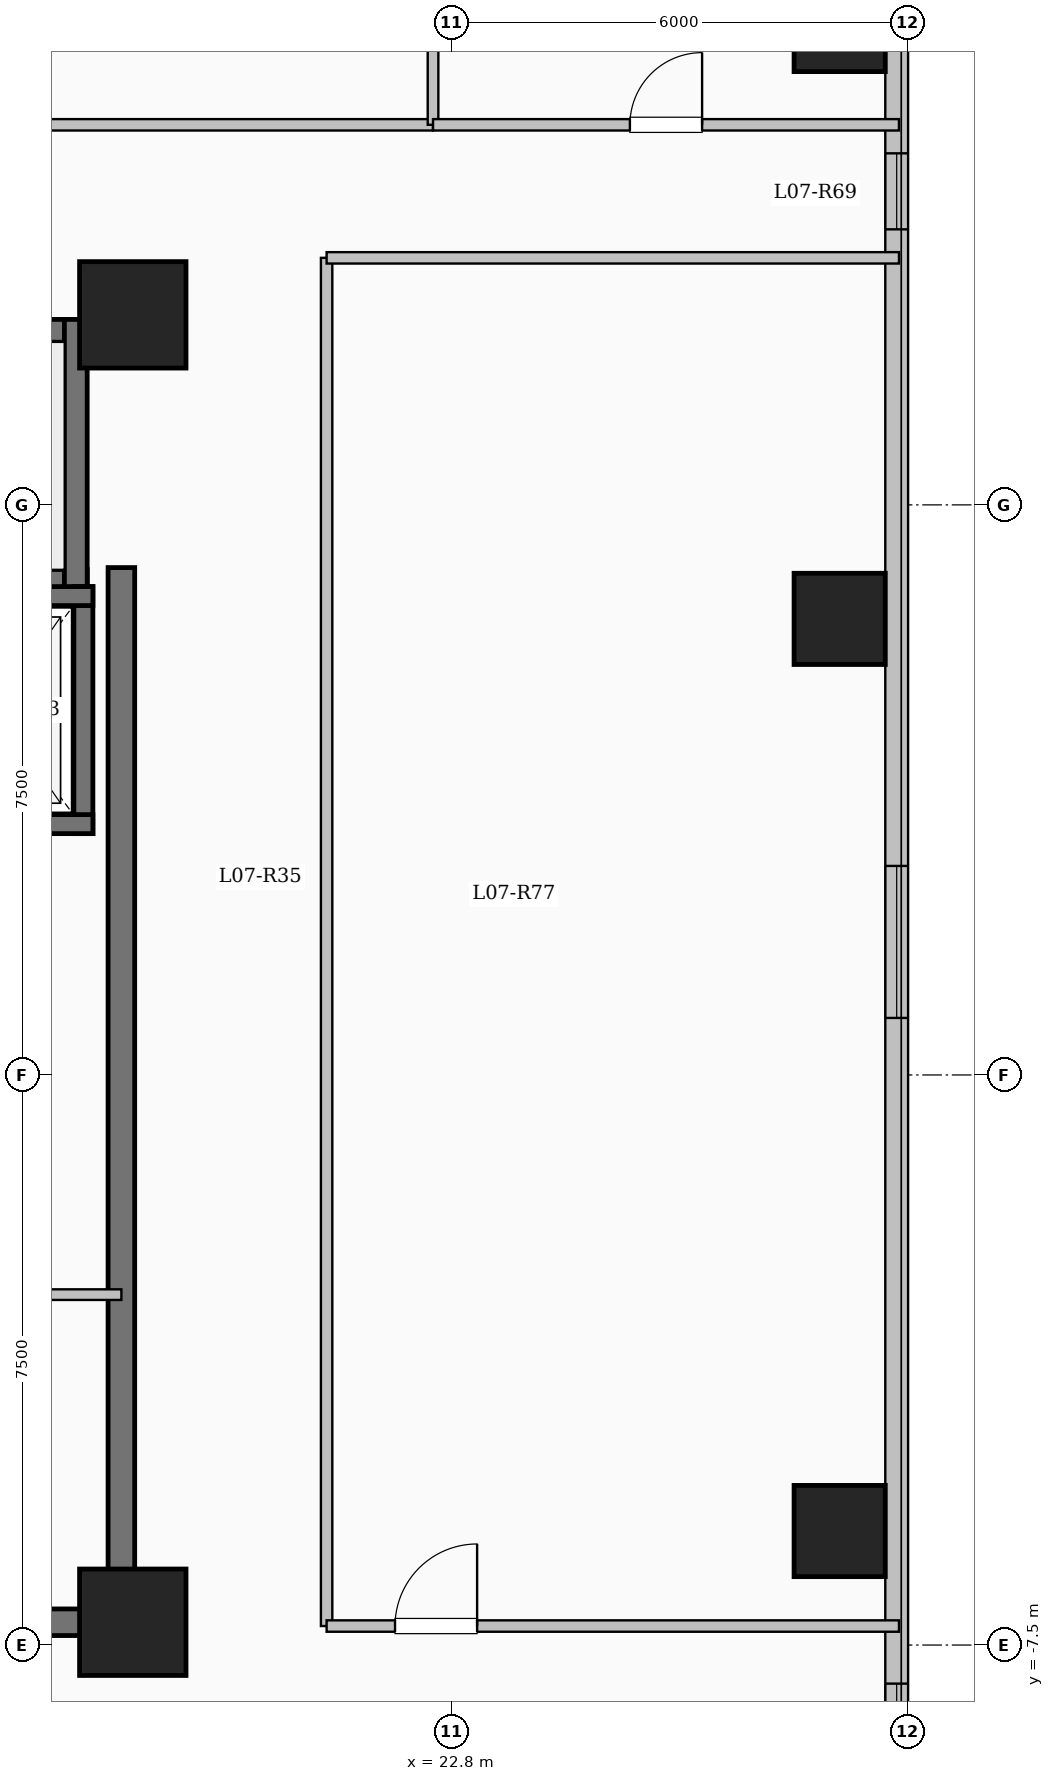
"""IFC4 building model, lengths in metres.
Left out: names, types, materials, properties, quantities, classifications, styles, units other than length and angle.
Written with IfcOpenShell. Run it as: python <this file> out.ifc"""

import sys

from ifc_helpers import new_model, si_unit, direction, frame, frame_2d, origin, origin_2d, place, context, subcontext, project, spatial, rectangle, extrude, element, fill, save


model = new_model("IFC4")
c1 = context("Model", 3, precision=1e-05, world=origin(), true_north=direction((0.0, 1.0)))
c2 = subcontext(c1, "Body", "Model", "MODEL_VIEW")
j1 = project(units=[si_unit("LENGTHUNIT", "METRE"), si_unit("PLANEANGLEUNIT", "RADIAN")], contexts=[c1])
p1 = place(None, origin())
s1 = spatial("IfcSite", under=j1, at=p1, CompositionType="ELEMENT")
p2 = place(p1, origin())
s2 = spatial("IfcBuilding", under=s1, at=p2, CompositionType="ELEMENT")
p3 = place(p2, frame((0.0, 0.0, 30.7)))
s3 = spatial("IfcBuildingStorey", under=s2, at=p3, CompositionType="ELEMENT", Elevation=30.7)
for number, where, z_axis, x_axis in (
    (1, (18.6, -7.2, 0.0), (0.0, 0.0, 1.0), (1.0, 0.0, 0.0)),
    (2, (18.6, 10.0, 0.0), (0.0, 0.0, 1.0), (1.0, 0.0, 0.0)),
):
    element("IfcColumn", number, at=place(p3, frame(where, z_axis=z_axis, x_axis=x_axis)), inside=s3, PredefinedType="COLUMN", context=c2, shape_type="SweptSolid", body=[
        extrude(rectangle(XDim=1.4, YDim=1.4, at=origin_2d()), origin(), (0.0, 0.0, 1.0), 3.35),
    ])
for number, where, z_axis, x_axis in (
    (3, (27.9, -6.0, 0.0), (0.0, 0.0, 1.0), (1.0, 0.0, 0.0)),
    (4, (27.9, 6.0, 0.0), (0.0, 0.0, 1.0), (1.0, 0.0, 0.0)),
    (5, (27.9, 13.8, 0.0), (0.0, 0.0, 1.0), (1.0, 0.0, 0.0)),
):
    element("IfcColumn", number, at=place(p3, frame(where, z_axis=z_axis, x_axis=x_axis)), inside=s3, PredefinedType="COLUMN", context=c2, shape_type="SweptSolid", body=[
        extrude(rectangle(XDim=1.2, YDim=1.2, at=origin_2d()), origin(), (0.0, 0.0, 1.0), 3.35),
    ])
p4 = place(p3, frame((28.65, 19.05, 0.0), z_axis=(0.0, 0.0, 1.0), x_axis=(0.0, -1.0, 0.0)))
e6 = element("IfcWall", 6, at=p4, inside=s3, PredefinedType="SOLIDWALL", context=c2, shape_type="SweptSolid", body=[
    extrude(rectangle(XDim=38.1, YDim=0.3, at=frame_2d((19.05, 0.0))), origin(), (0.0, 0.0, 1.0), 3.1),
])
p5 = place(p4, frame((2.275, 0.0, 0.9)))
e7 = element("IfcOpeningElement", 7, at=p5, cuts=e6, PredefinedType="OPENING", context=c2, shape_type="SweptSolid", body=[
    extrude(rectangle(XDim=2.0, YDim=1.7, at=frame_2d((1.0, 0.85))), frame((0.0, 0.16, 0.0), z_axis=(0.0, -1.0, 0.0), x_axis=(1.0, 0.0, 0.0)), (0.0, 0.0, 1.0), 0.32),
])
p6 = place(p4, frame((6.925, 0.0, 0.95)))
e8 = element("IfcOpeningElement", 8, at=p6, cuts=e6, PredefinedType="OPENING", context=c2, shape_type="SweptSolid", body=[
    extrude(rectangle(XDim=1.0, YDim=1.5, at=frame_2d((0.5, 0.75))), frame((0.0, 0.16, 0.0), z_axis=(0.0, -1.0, 0.0), x_axis=(1.0, 0.0, 0.0)), (0.0, 0.0, 1.0), 0.32),
])
p7 = place(p4, frame((16.3, 0.0, 0.9)))
e9 = element("IfcOpeningElement", 9, at=p7, cuts=e6, PredefinedType="OPENING", context=c2, shape_type="SweptSolid", body=[
    extrude(rectangle(XDim=2.0, YDim=1.7, at=frame_2d((1.0, 0.85))), frame((0.0, 0.16, 0.0), z_axis=(0.0, -1.0, 0.0), x_axis=(1.0, 0.0, 0.0)), (0.0, 0.0, 1.0), 0.32),
])
p8 = place(p4, frame((27.058, 0.0, 0.9)))
e10 = element("IfcOpeningElement", 10, at=p8, cuts=e6, PredefinedType="OPENING", context=c2, shape_type="SweptSolid", body=[
    extrude(rectangle(XDim=1.5, YDim=1.65, at=frame_2d((0.75, 0.825))), frame((0.0, 0.16, 0.0), z_axis=(0.0, -1.0, 0.0), x_axis=(1.0, 0.0, 0.0)), (0.0, 0.0, 1.0), 0.32),
])
p9 = place(p4, frame((32.55, 0.0, 0.9)))
e11 = element("IfcOpeningElement", 11, at=p9, cuts=e6, PredefinedType="OPENING", context=c2, shape_type="SweptSolid", body=[
    extrude(rectangle(XDim=2.4, YDim=1.8, at=frame_2d((1.2, 0.9))), frame((0.0, 0.16, 0.0), z_axis=(0.0, -1.0, 0.0), x_axis=(1.0, 0.0, 0.0)), (0.0, 0.0, 1.0), 0.32),
])
p10 = place(p3, frame((10.0, 9.79, 0.0), z_axis=(0.0, 0.0, 1.0), x_axis=(1.0, 0.0, 0.0)))
e12 = element("IfcWall", 12, at=p10, inside=s3, PredefinedType="SHEAR", context=c2, shape_type="SweptSolid", body=[
    extrude(rectangle(XDim=8.0, YDim=0.3, at=frame_2d((4.0, 0.0))), origin(), (0.0, 0.0, 1.0), 3.35),
])
p11 = place(p3, frame((10.0, 6.5, 0.0), z_axis=(0.0, 0.0, 1.0), x_axis=(1.0, 0.0, 0.0)))
e13 = element("IfcWall", 13, at=p11, inside=s3, PredefinedType="SHEAR", context=c2, shape_type="SweptSolid", body=[
    extrude(rectangle(XDim=8.0, YDim=0.3, at=frame_2d((4.0, 0.0))), origin(), (0.0, 0.0, 1.0), 3.35),
])
p12 = place(p11, frame((0.55, 0.0, 0.0)))
e14 = element("IfcOpeningElement", 14, at=p12, cuts=e13, PredefinedType="OPENING", context=c2, shape_type="SweptSolid", body=[
    extrude(rectangle(XDim=1.0, YDim=2.15, at=frame_2d((0.5, 1.075))), frame((0.0, 0.16, 0.0), z_axis=(0.0, -1.0, 0.0), x_axis=(1.0, 0.0, 0.0)), (0.0, 0.0, 1.0), 0.32),
])
p13 = place(p3, frame((17.85, 6.35, 0.0), z_axis=(0.0, 0.0, 1.0), x_axis=(0.0, 1.0, 0.0)))
e15 = element("IfcWall", 15, at=p13, inside=s3, PredefinedType="SHEAR", context=c2, shape_type="SweptSolid", body=[
    extrude(rectangle(XDim=3.59, YDim=0.3, at=frame_2d((1.795, 0.0))), origin(), (0.0, 0.0, 1.0), 3.35),
])
p14 = place(p3, frame((17.95, 3.175, 0.0), z_axis=(0.0, 0.0, 1.0), x_axis=(0.0, 1.0, 0.0)))
e16 = element("IfcWall", 16, at=p14, inside=s3, PredefinedType="SHEAR", context=c2, shape_type="SweptSolid", body=[
    extrude(rectangle(XDim=3.25, YDim=0.25, at=frame_2d((1.625, 0.0))), origin(), (0.0, 0.0, 1.0), 3.35),
])
for number, where, z_axis, x_axis in (
    (17, (15.525, 3.3, 0.0), (0.0, 0.0, 1.0), (1.0, 0.0, 0.0)),
    (18, (15.525, 6.3, 0.0), (0.0, 0.0, 1.0), (1.0, 0.0, 0.0)),
):
    element("IfcWall", number, at=place(p3, frame(where, z_axis=z_axis, x_axis=x_axis)), inside=s3, PredefinedType="SHEAR", context=c2, shape_type="SweptSolid", body=[
        extrude(rectangle(XDim=2.55, YDim=0.25, at=frame_2d((1.275, 0.0))), origin(), (0.0, 0.0, 1.0), 3.35),
    ])
p15 = place(p3, frame((18.45, -7.375, 0.0), z_axis=(0.0, 0.0, 1.0), x_axis=(0.0, 1.0, 0.0)))
e19 = element("IfcWall", 19, at=p15, inside=s3, PredefinedType="SHEAR", context=c2, shape_type="SweptSolid", body=[
    extrude(rectangle(XDim=14.05, YDim=0.35, at=frame_2d((7.025, 0.0))), origin(), (0.0, 0.0, 1.0), 3.35),
])
p16 = place(p3, frame((10.075, -7.2, 0.0), z_axis=(0.0, 0.0, 1.0), x_axis=(1.0, 0.0, 0.0)))
e20 = element("IfcWall", 20, at=p16, inside=s3, PredefinedType="SHEAR", context=c2, shape_type="SweptSolid", body=[
    extrude(rectangle(XDim=8.55, YDim=0.35, at=frame_2d((4.275, 0.0))), origin(), (0.0, 0.0, 1.0), 3.35),
])
p17 = place(p3, frame((15.4, -2.89, 0.0), z_axis=(0.0, 0.0, 1.0), x_axis=(1.0, 0.0, 0.0)))
e21 = element("IfcWall", 21, at=p17, inside=s3, PredefinedType="PARTITIONING", context=c2, shape_type="SweptSolid", body=[
    extrude(rectangle(XDim=3.05, YDim=0.14, at=frame_2d((1.525, 0.0))), origin(), (0.0, 0.0, 1.0), 3.1),
])
p18 = place(p17, frame((1.05, 0.0, 0.0)))
e22 = element("IfcOpeningElement", 22, at=p18, cuts=e21, PredefinedType="OPENING", context=c2, shape_type="SweptSolid", body=[
    extrude(rectangle(XDim=0.9, YDim=2.08, at=frame_2d((0.45, 1.04))), frame((0.0, 0.08, 0.0), z_axis=(0.0, -1.0, 0.0), x_axis=(1.0, 0.0, 0.0)), (0.0, 0.0, 1.0), 0.16),
])
p19 = place(p3, frame((3.85, 12.5, 0.0), z_axis=(0.0, 0.0, 1.0), x_axis=(1.0, 0.0, 0.0)))
e23 = element("IfcWall", 23, at=p19, inside=s3, PredefinedType="PARTITIONING", context=c2, shape_type="SweptSolid", body=[
    extrude(rectangle(XDim=18.7, YDim=0.15, at=frame_2d((9.35, 0.0))), origin(), (0.0, 0.0, 1.0), 3.1),
])
p20 = place(p19, frame((0.7, 0.0, 0.0)))
e24 = element("IfcOpeningElement", 24, at=p20, cuts=e23, PredefinedType="OPENING", context=c2, shape_type="SweptSolid", body=[
    extrude(rectangle(XDim=0.96, YDim=2.15, at=frame_2d((0.48, 1.075))), frame((0.0, 0.085, 0.0), z_axis=(0.0, -1.0, 0.0), x_axis=(1.0, 0.0, 0.0)), (0.0, 0.0, 1.0), 0.17),
])
p21 = place(p3, frame((21.15, -7.25, 0.0), z_axis=(0.0, 0.0, 1.0), x_axis=(0.0, 1.0, 0.0)))
e25 = element("IfcWall", 25, at=p21, inside=s3, PredefinedType="PARTITIONING", context=c2, shape_type="SweptSolid", body=[
    extrude(rectangle(XDim=18.0, YDim=0.15, at=frame_2d((9.0, 0.0))), origin(), (0.0, 0.0, 1.0), 2.585),
])
p22 = place(p3, frame((21.15, -7.25, 0.0), z_axis=(0.0, 0.0, 1.0), x_axis=(1.0, 0.0, 0.0)))
e26 = element("IfcWall", 26, at=p22, inside=s3, PredefinedType="PARTITIONING", context=c2, shape_type="SweptSolid", body=[
    extrude(rectangle(XDim=7.53, YDim=0.15, at=frame_2d((3.765, 0.0))), origin(), (0.0, 0.0, 1.0), 3.1),
])
p23 = place(p22, frame((0.9, 0.0, 0.0)))
e27 = element("IfcOpeningElement", 27, at=p23, cuts=e26, PredefinedType="OPENING", context=c2, shape_type="SweptSolid", body=[
    extrude(rectangle(XDim=1.08, YDim=2.15, at=frame_2d((0.54, 1.075))), frame((0.0, 0.085, 0.0), z_axis=(0.0, -1.0, 0.0), x_axis=(1.0, 0.0, 0.0)), (0.0, 0.0, 1.0), 0.17),
])
p24 = place(p3, frame((21.15, 10.75, 0.0), z_axis=(0.0, 0.0, 1.0), x_axis=(1.0, 0.0, 0.0)))
e28 = element("IfcWall", 28, at=p24, inside=s3, PredefinedType="PARTITIONING", context=c2, shape_type="SweptSolid", body=[
    extrude(rectangle(XDim=7.53, YDim=0.15, at=frame_2d((3.765, 0.0))), origin(), (0.0, 0.0, 1.0), 3.1),
])
p25 = place(p3, frame((22.55, 12.5, 0.0), z_axis=(0.0, 0.0, 1.0), x_axis=(0.0, 1.0, 0.0)))
e29 = element("IfcWall", 29, at=p25, inside=s3, PredefinedType="PARTITIONING", context=c2, shape_type="SweptSolid", body=[
    extrude(rectangle(XDim=6.55, YDim=0.14, at=frame_2d((3.275, 0.0))), origin(), (0.0, 0.0, 1.0), 3.1),
])
p26 = place(p3, frame((22.55, 12.5, 0.0), z_axis=(0.0, 0.0, 1.0), x_axis=(1.0, 0.0, 0.0)))
e30 = element("IfcWall", 30, at=p26, inside=s3, PredefinedType="PARTITIONING", context=c2, shape_type="SweptSolid", body=[
    extrude(rectangle(XDim=6.13, YDim=0.15, at=frame_2d((3.065, 0.0))), origin(), (0.0, 0.0, 1.0), 3.1),
])
p27 = place(p26, frame((2.59, 0.0, 0.0)))
e31 = element("IfcOpeningElement", 31, at=p27, cuts=e30, PredefinedType="OPENING", context=c2, shape_type="SweptSolid", body=[
    extrude(rectangle(XDim=0.95, YDim=2.15, at=frame_2d((0.475, 1.075))), frame((0.0, 0.085, 0.0), z_axis=(0.0, -1.0, 0.0), x_axis=(1.0, 0.0, 0.0)), (0.0, 0.0, 1.0), 0.17),
])
p28 = place(p6, origin())
e32 = element("IfcWindow", 32, at=p28, inside=s3, PartitioningType="SINGLE_PANEL", PredefinedType="WINDOW", context=c2, shape_type="SweptSolid", body=[
    extrude(rectangle(XDim=1.0, YDim=1.5, at=frame_2d((0.5, 0.75))), frame((0.0, 0.03, 0.0), z_axis=(0.0, -1.0, 0.0), x_axis=(1.0, 0.0, 0.0)), (0.0, 0.0, 1.0), 0.06),
])
fill(e8, e32)
p29 = place(p7, origin())
e33 = element("IfcWindow", 33, at=p29, inside=s3, PartitioningType="SINGLE_PANEL", PredefinedType="WINDOW", context=c2, shape_type="SweptSolid", body=[
    extrude(rectangle(XDim=2.0, YDim=1.7, at=frame_2d((1.0, 0.85))), frame((0.0, 0.03, 0.0), z_axis=(0.0, -1.0, 0.0), x_axis=(1.0, 0.0, 0.0)), (0.0, 0.0, 1.0), 0.06),
])
fill(e9, e33)
p30 = place(p8, origin())
e34 = element("IfcWindow", 34, at=p30, inside=s3, PartitioningType="SINGLE_PANEL", PredefinedType="WINDOW", context=c2, shape_type="SweptSolid", body=[
    extrude(rectangle(XDim=1.5, YDim=1.65, at=frame_2d((0.75, 0.825))), frame((0.0, 0.03, 0.0), z_axis=(0.0, -1.0, 0.0), x_axis=(1.0, 0.0, 0.0)), (0.0, 0.0, 1.0), 0.06),
])
fill(e10, e34)
p31 = place(p27, origin())
e35 = element("IfcDoor", 35, at=p31, inside=s3, OperationType="SINGLE_SWING_RIGHT", PredefinedType="DOOR", context=c2, shape_type="SweptSolid", body=[
    extrude(rectangle(XDim=0.95, YDim=2.15, at=frame_2d((0.475, 1.075))), frame((0.0, 0.025, 0.0), z_axis=(0.0, -1.0, 0.0), x_axis=(1.0, 0.0, 0.0)), (0.0, 0.0, 1.0), 0.05),
])
fill(e31, e35)
p32 = place(p23, origin())
e36 = element("IfcDoor", 36, at=p32, inside=s3, OperationType="SINGLE_SWING_RIGHT", PredefinedType="DOOR", context=c2, shape_type="SweptSolid", body=[
    extrude(rectangle(XDim=1.08, YDim=2.15, at=frame_2d((0.54, 1.075))), frame((0.0, 0.025, 0.0), z_axis=(0.0, -1.0, 0.0), x_axis=(1.0, 0.0, 0.0)), (0.0, 0.0, 1.0), 0.05),
])
fill(e27, e36)
save(model, sys.argv[1])
